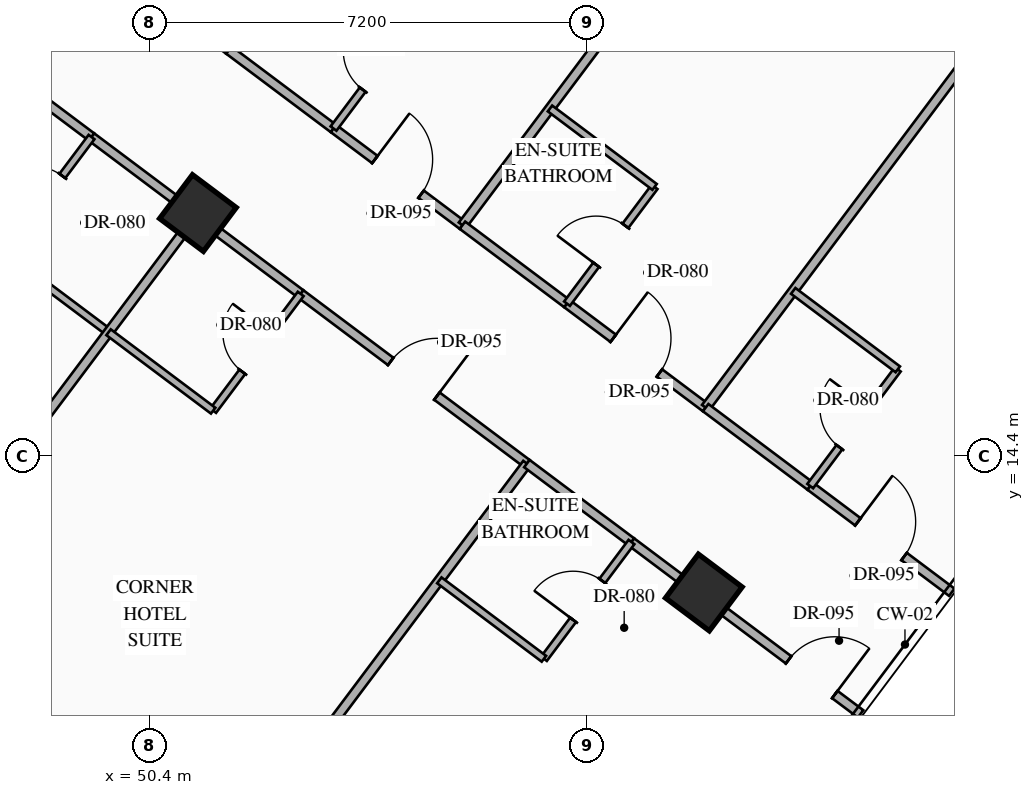
"""IFC4 building model, lengths in metres.
Left out: names, types, materials, properties, quantities, classifications, styles, units other than length and angle.
Written with IfcOpenShell. Run it as: python <this file> out.ifc"""

import sys

from ifc_helpers import new_model, si_unit, direction, frame, frame_2d, origin, origin_2d, place, context, subcontext, project, spatial, rectangle, hollow_rectangle, extrude, element, fill, save


model = new_model("IFC4")
c1 = context("Model", 3, precision=1e-05, world=origin(), true_north=direction((0.0, 1.0)))
c2 = subcontext(c1, "Body", "Model", "MODEL_VIEW")
j1 = project(units=[si_unit("LENGTHUNIT", "METRE"), si_unit("PLANEANGLEUNIT", "RADIAN")], contexts=[c1])
p1 = place(None, origin())
s1 = spatial("IfcSite", under=j1, at=p1, CompositionType="ELEMENT")
p2 = place(p1, origin())
s2 = spatial("IfcBuilding", under=s1, at=p2, CompositionType="ELEMENT")
p3 = place(p2, frame((0.0, 0.0, 74.6)))
s3 = spatial("IfcBuildingStorey", under=s2, at=p3, CompositionType="ELEMENT", Elevation=74.6)
for number, where, z_axis, x_axis in (
    (1, (51.2, 18.4, 0.0), (0.0, 0.0, 1.0), (0.8, -0.6, 0.0)),
    (2, (59.52, 12.16, 0.0), (0.0, 0.0, 1.0), (0.8, -0.6, 0.0)),
):
    element("IfcColumn", number, at=place(p3, frame(where, z_axis=z_axis, x_axis=x_axis)), inside=s3, PredefinedType="COLUMN", context=c2, shape_type="SweptSolid", body=[
        extrude(hollow_rectangle(XDim=0.9, YDim=0.9, WallThickness=0.036, at=origin_2d()), origin(), (0.0, 0.0, 1.0), 3.35),
    ])
p4 = place(p3, frame((53.318, 2.487, 0.0), z_axis=(0.0, 0.0, 1.0), x_axis=(-0.800004174678, 0.599994433723, 0.0)))
e3 = element("IfcWall", 3, at=p4, inside=s3, PredefinedType="STANDARD", context=c2, shape_type="SweptSolid", body=[
    extrude(rectangle(XDim=35.089, YDim=0.28, at=frame_2d((17.544, 0.0))), origin(), (0.0, 0.0, 1.0), 3.13),
])
p5 = place(p4, frame((1.931, 0.0, 0.85)))
e4 = element("IfcOpeningElement", 4, at=p5, cuts=e3, PredefinedType="OPENING", context=c2, shape_type="SweptSolid", body=[
    extrude(rectangle(XDim=1.4, YDim=1.8, at=frame_2d((0.7, 0.9))), frame((0.0, 0.15, 0.0), z_axis=(0.0, -1.0, 0.0), x_axis=(1.0, 0.0, 0.0)), (0.0, 0.0, 1.0), 0.3),
])
p6 = place(p4, frame((6.819, 0.0, 0.85)))
e5 = element("IfcOpeningElement", 5, at=p6, cuts=e3, PredefinedType="OPENING", context=c2, shape_type="SweptSolid", body=[
    extrude(rectangle(XDim=1.4, YDim=1.8, at=frame_2d((0.7, 0.9))), frame((0.0, 0.15, 0.0), z_axis=(0.0, -1.0, 0.0), x_axis=(1.0, 0.0, 0.0)), (0.0, 0.0, 1.0), 0.3),
])
p7 = place(p4, frame((11.832, 0.0, 0.85)))
e6 = element("IfcOpeningElement", 6, at=p7, cuts=e3, PredefinedType="OPENING", context=c2, shape_type="SweptSolid", body=[
    extrude(rectangle(XDim=1.4, YDim=1.8, at=frame_2d((0.7, 0.9))), frame((0.0, 0.15, 0.0), z_axis=(0.0, -1.0, 0.0), x_axis=(1.0, 0.0, 0.0)), (0.0, 0.0, 1.0), 0.3),
])
p8 = place(p4, frame((17.647, 0.0, 0.85)))
e7 = element("IfcOpeningElement", 7, at=p8, cuts=e3, PredefinedType="OPENING", context=c2, shape_type="SweptSolid", body=[
    extrude(rectangle(XDim=1.4, YDim=1.8, at=frame_2d((0.7, 0.9))), frame((0.0, 0.15, 0.0), z_axis=(0.0, -1.0, 0.0), x_axis=(1.0, 0.0, 0.0)), (0.0, 0.0, 1.0), 0.3),
])
p9 = place(p4, frame((21.857, 0.0, 0.85)))
e8 = element("IfcOpeningElement", 8, at=p9, cuts=e3, PredefinedType="OPENING", context=c2, shape_type="SweptSolid", body=[
    extrude(rectangle(XDim=1.4, YDim=1.8, at=frame_2d((0.7, 0.9))), frame((0.0, 0.15, 0.0), z_axis=(0.0, -1.0, 0.0), x_axis=(1.0, 0.0, 0.0)), (0.0, 0.0, 1.0), 0.3),
])
p10 = place(p4, frame((26.87, 0.0, 0.85)))
e9 = element("IfcOpeningElement", 9, at=p10, cuts=e3, PredefinedType="OPENING", context=c2, shape_type="SweptSolid", body=[
    extrude(rectangle(XDim=1.4, YDim=1.8, at=frame_2d((0.7, 0.9))), frame((0.0, 0.15, 0.0), z_axis=(0.0, -1.0, 0.0), x_axis=(1.0, 0.0, 0.0)), (0.0, 0.0, 1.0), 0.3),
])
p11 = place(p4, frame((31.757, 0.0, 0.85)))
e10 = element("IfcOpeningElement", 10, at=p11, cuts=e3, PredefinedType="OPENING", context=c2, shape_type="SweptSolid", body=[
    extrude(rectangle(XDim=1.4, YDim=1.8, at=frame_2d((0.7, 0.9))), frame((0.0, 0.15, 0.0), z_axis=(0.0, -1.0, 0.0), x_axis=(1.0, 0.0, 0.0)), (0.0, 0.0, 1.0), 0.3),
])
p12 = place(p3, frame((49.59, 22.67, 0.0), z_axis=(0.0, 0.0, 1.0), x_axis=(0.800011056104, -0.599985258246, 0.0)))
e11 = element("IfcWall", 11, at=p12, inside=s3, PredefinedType="PARTITIONING", context=c2, shape_type="SweptSolid", body=[
    extrude(rectangle(XDim=2.65, YDim=0.15, at=frame_2d((1.325, 0.0))), origin(), (0.0, 0.0, 1.0), 2.775),
])
p13 = place(p12, frame((0.85, 0.0, 0.0)))
e12 = element("IfcOpeningElement", 12, at=p13, cuts=e11, PredefinedType="OPENING", context=c2, shape_type="SweptSolid", body=[
    extrude(rectangle(XDim=0.95, YDim=2.15, at=frame_2d((0.475, 1.075))), frame((0.0, 0.085, 0.0), z_axis=(0.0, -1.0, 0.0), x_axis=(1.0, 0.0, 0.0)), (0.0, 0.0, 1.0), 0.17),
])
p14 = place(p3, frame((51.71, 21.08, 0.0), z_axis=(0.0, 0.0, 1.0), x_axis=(0.599996617946, 0.80000253653, 0.0)))
e13 = element("IfcWall", 13, at=p14, inside=s3, PredefinedType="PARTITIONING", context=c2, shape_type="SweptSolid", body=[
    extrude(rectangle(XDim=11.55, YDim=0.15, at=frame_2d((5.775, 0.0))), origin(), (0.0, 0.0, 1.0), 3.13),
])
p15 = place(p3, frame((51.71, 21.08, 0.0), z_axis=(0.0, 0.0, 1.0), x_axis=(0.79998637334, -0.60001816845, 0.0)))
e14 = element("IfcWall", 14, at=p15, inside=s3, PredefinedType="PARTITIONING", context=c2, shape_type="SweptSolid", body=[
    extrude(rectangle(XDim=2.15, YDim=0.15, at=frame_2d((1.075, 0.0))), origin(), (0.0, 0.0, 1.0), 2.775),
])
p16 = place(p3, frame((53.43, 19.79, 0.0), z_axis=(0.0, 0.0, 1.0), x_axis=(0.8, -0.6, 0.0)))
e15 = element("IfcWall", 15, at=p16, inside=s3, PredefinedType="PARTITIONING", context=c2, shape_type="SweptSolid", body=[
    extrude(rectangle(XDim=2.65, YDim=0.15, at=frame_2d((1.325, 0.0))), origin(), (0.0, 0.0, 1.0), 2.775),
])
p17 = place(p16, frame((0.85, 0.0, 0.0)))
e16 = element("IfcOpeningElement", 16, at=p17, cuts=e15, PredefinedType="OPENING", context=c2, shape_type="SweptSolid", body=[
    extrude(rectangle(XDim=0.95, YDim=2.15, at=frame_2d((0.475, 1.075))), frame((0.0, 0.085, 0.0), z_axis=(0.0, -1.0, 0.0), x_axis=(1.0, 0.0, 0.0)), (0.0, 0.0, 1.0), 0.17),
])
p18 = place(p3, frame((53.43, 19.79, 0.0), z_axis=(0.0, 0.0, 1.0), x_axis=(0.600065100855, 0.79995117022, 0.0)))
e17 = element("IfcWall", 17, at=p18, inside=s3, PredefinedType="PARTITIONING", context=c2, shape_type="SweptSolid", body=[
    extrude(rectangle(XDim=2.4, YDim=0.12, at=frame_2d((1.2, 0.0))), origin(), (0.0, 0.0, 1.0), 3.13),
])
p19 = place(p18, frame((0.8, 0.0, 0.0)))
e18 = element("IfcOpeningElement", 18, at=p19, cuts=e17, PredefinedType="OPENING", context=c2, shape_type="SweptSolid", body=[
    extrude(rectangle(XDim=0.8, YDim=2.06, at=frame_2d((0.4, 1.03))), frame((0.0, 0.07, 0.0), z_axis=(0.0, -1.0, 0.0), x_axis=(1.0, 0.0, 0.0)), (0.0, 0.0, 1.0), 0.14),
])
p20 = place(p3, frame((55.55, 18.2, 0.0), z_axis=(0.0, 0.0, 1.0), x_axis=(0.599996617946, 0.80000253653, 0.0)))
e19 = element("IfcWall", 19, at=p20, inside=s3, PredefinedType="PARTITIONING", context=c2, shape_type="SweptSolid", body=[
    extrude(rectangle(XDim=11.55, YDim=0.15, at=frame_2d((5.775, 0.0))), origin(), (0.0, 0.0, 1.0), 3.13),
])
p21 = place(p3, frame((55.55, 18.2, 0.0), z_axis=(0.0, 0.0, 1.0), x_axis=(0.79998637334, -0.60001816845, 0.0)))
e20 = element("IfcWall", 20, at=p21, inside=s3, PredefinedType="PARTITIONING", context=c2, shape_type="SweptSolid", body=[
    extrude(rectangle(XDim=2.15, YDim=0.15, at=frame_2d((1.075, 0.0))), origin(), (0.0, 0.0, 1.0), 2.775),
])
p22 = place(p3, frame((57.27, 16.91, 0.0), z_axis=(0.0, 0.0, 1.0), x_axis=(0.800010279488, -0.599986293772, 0.0)))
e21 = element("IfcWall", 21, at=p22, inside=s3, PredefinedType="PARTITIONING", context=c2, shape_type="SweptSolid", body=[
    extrude(rectangle(XDim=2.85, YDim=0.15, at=frame_2d((1.425, 0.0))), origin(), (0.0, 0.0, 1.0), 2.775),
])
p23 = place(p22, frame((0.95, 0.0, 0.0)))
e22 = element("IfcOpeningElement", 22, at=p23, cuts=e21, PredefinedType="OPENING", context=c2, shape_type="SweptSolid", body=[
    extrude(rectangle(XDim=0.95, YDim=2.15, at=frame_2d((0.475, 1.075))), frame((0.0, 0.085, 0.0), z_axis=(0.0, -1.0, 0.0), x_axis=(1.0, 0.0, 0.0)), (0.0, 0.0, 1.0), 0.17),
])
p24 = place(p3, frame((57.27, 16.91, 0.0), z_axis=(0.0, 0.0, 1.0), x_axis=(0.599951172744, 0.800036618114, 0.0)))
e23 = element("IfcWall", 23, at=p24, inside=s3, PredefinedType="PARTITIONING", context=c2, shape_type="SweptSolid", body=[
    extrude(rectangle(XDim=2.4, YDim=0.12, at=frame_2d((1.2, 0.0))), origin(), (0.0, 0.0, 1.0), 3.13),
])
p25 = place(p24, frame((0.8, 0.0, 0.0)))
e24 = element("IfcOpeningElement", 24, at=p25, cuts=e23, PredefinedType="OPENING", context=c2, shape_type="SweptSolid", body=[
    extrude(rectangle(XDim=0.8, YDim=2.06, at=frame_2d((0.4, 1.03))), frame((0.0, 0.07, 0.0), z_axis=(0.0, -1.0, 0.0), x_axis=(1.0, 0.0, 0.0)), (0.0, 0.0, 1.0), 0.14),
])
p26 = place(p3, frame((56.99, 20.12, 0.0), z_axis=(0.0, 0.0, 1.0), x_axis=(0.79998637334, -0.60001816845, 0.0)))
e25 = element("IfcWall", 25, at=p26, inside=s3, PredefinedType="PARTITIONING", context=c2, shape_type="SweptSolid", body=[
    extrude(rectangle(XDim=2.15, YDim=0.12, at=frame_2d((1.075, 0.0))), origin(), (0.0, 0.0, 1.0), 3.13),
])
p27 = place(p3, frame((59.55, 15.2, 0.0), z_axis=(0.0, 0.0, 1.0), x_axis=(0.599996617946, 0.80000253653, 0.0)))
e26 = element("IfcWall", 26, at=p27, inside=s3, PredefinedType="PARTITIONING", context=c2, shape_type="SweptSolid", body=[
    extrude(rectangle(XDim=11.55, YDim=0.15, at=frame_2d((5.775, 0.0))), origin(), (0.0, 0.0, 1.0), 3.13),
])
p28 = place(p3, frame((59.55, 15.2, 0.0), z_axis=(0.0, 0.0, 1.0), x_axis=(0.79998637334, -0.60001816845, 0.0)))
e27 = element("IfcWall", 27, at=p28, inside=s3, PredefinedType="PARTITIONING", context=c2, shape_type="SweptSolid", body=[
    extrude(rectangle(XDim=2.15, YDim=0.15, at=frame_2d((1.075, 0.0))), origin(), (0.0, 0.0, 1.0), 2.775),
])
p29 = place(p3, frame((61.27, 13.91, 0.0), z_axis=(0.0, 0.0, 1.0), x_axis=(0.800010068184, -0.59998657552, 0.0)))
e28 = element("IfcWall", 28, at=p29, inside=s3, PredefinedType="PARTITIONING", context=c2, shape_type="SweptSolid", body=[
    extrude(rectangle(XDim=2.91, YDim=0.15, at=frame_2d((1.455, 0.0))), origin(), (0.0, 0.0, 1.0), 3.13),
])
p30 = place(p29, frame((0.98, 0.0, 0.0)))
e29 = element("IfcOpeningElement", 29, at=p30, cuts=e28, PredefinedType="OPENING", context=c2, shape_type="SweptSolid", body=[
    extrude(rectangle(XDim=0.95, YDim=2.15, at=frame_2d((0.475, 1.075))), frame((0.0, 0.085, 0.0), z_axis=(0.0, -1.0, 0.0), x_axis=(1.0, 0.0, 0.0)), (0.0, 0.0, 1.0), 0.17),
])
p31 = place(p3, frame((61.27, 13.91, 0.0), z_axis=(0.0, 0.0, 1.0), x_axis=(0.599951172744, 0.800036618114, 0.0)))
e30 = element("IfcWall", 30, at=p31, inside=s3, PredefinedType="PARTITIONING", context=c2, shape_type="SweptSolid", body=[
    extrude(rectangle(XDim=2.4, YDim=0.12, at=frame_2d((1.2, 0.0))), origin(), (0.0, 0.0, 1.0), 3.13),
])
p32 = place(p31, frame((0.8, 0.0, 0.0)))
e31 = element("IfcOpeningElement", 31, at=p32, cuts=e30, PredefinedType="OPENING", context=c2, shape_type="SweptSolid", body=[
    extrude(rectangle(XDim=0.8, YDim=2.06, at=frame_2d((0.4, 1.03))), frame((0.0, 0.07, 0.0), z_axis=(0.0, -1.0, 0.0), x_axis=(1.0, 0.0, 0.0)), (0.0, 0.0, 1.0), 0.14),
])
p33 = place(p3, frame((60.99, 17.12, 0.0), z_axis=(0.0, 0.0, 1.0), x_axis=(0.79998637334, -0.60001816845, 0.0)))
e32 = element("IfcWall", 32, at=p33, inside=s3, PredefinedType="PARTITIONING", context=c2, shape_type="SweptSolid", body=[
    extrude(rectangle(XDim=2.15, YDim=0.12, at=frame_2d((1.075, 0.0))), origin(), (0.0, 0.0, 1.0), 3.13),
])
p34 = place(p3, frame((46.37, 21.96, 0.0), z_axis=(0.0, 0.0, 1.0), x_axis=(0.799977170108, -0.600030438649, 0.0)))
e33 = element("IfcWall", 33, at=p34, inside=s3, PredefinedType="PARTITIONING", context=c2, shape_type="SweptSolid", body=[
    extrude(rectangle(XDim=3.85, YDim=0.15, at=frame_2d((1.925, 0.0))), origin(), (0.0, 0.0, 1.0), 2.425),
])
p35 = place(p34, frame((1.45, 0.0, 0.0)))
e34 = element("IfcOpeningElement", 34, at=p35, cuts=e33, PredefinedType="OPENING", context=c2, shape_type="SweptSolid", body=[
    extrude(rectangle(XDim=0.95, YDim=2.15, at=frame_2d((0.475, 1.075))), frame((0.0, 0.085, 0.0), z_axis=(0.0, -1.0, 0.0), x_axis=(1.0, 0.0, 0.0)), (0.0, 0.0, 1.0), 0.17),
])
p36 = place(p3, frame((49.45, 19.65, 0.0), z_axis=(0.0, 0.0, 1.0), x_axis=(0.800040880289, -0.59994548908, 0.0)))
e35 = element("IfcWall", 35, at=p36, inside=s3, PredefinedType="PARTITIONING", context=c2, shape_type="SweptSolid", body=[
    extrude(rectangle(XDim=2.15, YDim=0.15, at=frame_2d((1.075, 0.0))), origin(), (0.0, 0.0, 1.0), 2.425),
])
p37 = place(p3, frame((48.01, 17.73, 0.0), z_axis=(0.0, 0.0, 1.0), x_axis=(0.6, 0.8, 0.0)))
e36 = element("IfcWall", 36, at=p37, inside=s3, PredefinedType="PARTITIONING", context=c2, shape_type="SweptSolid", body=[
    extrude(rectangle(XDim=2.4, YDim=0.12, at=frame_2d((1.2, 0.0))), origin(), (0.0, 0.0, 1.0), 3.13),
])
p38 = place(p37, frame((0.8, 0.0, 0.0)))
e37 = element("IfcOpeningElement", 37, at=p38, cuts=e36, PredefinedType="OPENING", context=c2, shape_type="SweptSolid", body=[
    extrude(rectangle(XDim=0.8, YDim=2.06, at=frame_2d((0.4, 1.03))), frame((0.0, 0.07, 0.0), z_axis=(0.0, -1.0, 0.0), x_axis=(1.0, 0.0, 0.0)), (0.0, 0.0, 1.0), 0.14),
])
p39 = place(p3, frame((48.01, 17.73, 0.0), z_axis=(0.0, 0.0, 1.0), x_axis=(0.79998637334, -0.60001816845, 0.0)))
e38 = element("IfcWall", 38, at=p39, inside=s3, PredefinedType="PARTITIONING", context=c2, shape_type="SweptSolid", body=[
    extrude(rectangle(XDim=2.15, YDim=0.12, at=frame_2d((1.075, 0.0))), origin(), (0.0, 0.0, 1.0), 3.13),
])
p40 = place(p3, frame((44.36, 9.28, 0.0), z_axis=(0.0, 0.0, 1.0), x_axis=(0.599986233332, 0.800010324816, 0.0)))
e39 = element("IfcWall", 39, at=p40, inside=s3, PredefinedType="PARTITIONING", context=c2, shape_type="SweptSolid", body=[
    extrude(rectangle(XDim=11.35, YDim=0.15, at=frame_2d((5.675, 0.0))), origin(), (0.0, 0.0, 1.0), 2.425),
])
p41 = place(p3, frame((51.17, 18.36, 0.0), z_axis=(0.0, 0.0, 1.0), x_axis=(0.79998637334, -0.60001816845, 0.0)))
e40 = element("IfcWall", 40, at=p41, inside=s3, PredefinedType="PARTITIONING", context=c2, shape_type="SweptSolid", body=[
    extrude(rectangle(XDim=2.15, YDim=0.15, at=frame_2d((1.075, 0.0))), origin(), (0.0, 0.0, 1.0), 2.425),
])
p42 = place(p3, frame((52.89, 17.07, 0.0), z_axis=(0.0, 0.0, 1.0), x_axis=(0.800012600101, -0.599983199498, 0.0)))
e41 = element("IfcWall", 41, at=p42, inside=s3, PredefinedType="PARTITIONING", context=c2, shape_type="SweptSolid", body=[
    extrude(rectangle(XDim=4.65, YDim=0.15, at=frame_2d((2.325, 0.0))), origin(), (0.0, 0.0, 1.0), 2.425),
])
p43 = place(p42, frame((1.85, 0.0, 0.0)))
e42 = element("IfcOpeningElement", 42, at=p43, cuts=e41, PredefinedType="OPENING", context=c2, shape_type="SweptSolid", body=[
    extrude(rectangle(XDim=0.95, YDim=2.15, at=frame_2d((0.475, 1.075))), frame((0.0, 0.085, 0.0), z_axis=(0.0, -1.0, 0.0), x_axis=(1.0, 0.0, 0.0)), (0.0, 0.0, 1.0), 0.17),
])
p44 = place(p3, frame((51.45, 15.15, 0.0), z_axis=(0.0, 0.0, 1.0), x_axis=(0.599951172744, 0.800036618114, 0.0)))
e43 = element("IfcWall", 43, at=p44, inside=s3, PredefinedType="PARTITIONING", context=c2, shape_type="SweptSolid", body=[
    extrude(rectangle(XDim=2.4, YDim=0.12, at=frame_2d((1.2, 0.0))), origin(), (0.0, 0.0, 1.0), 3.13),
])
p45 = place(p44, frame((0.8, 0.0, 0.0)))
e44 = element("IfcOpeningElement", 44, at=p45, cuts=e43, PredefinedType="OPENING", context=c2, shape_type="SweptSolid", body=[
    extrude(rectangle(XDim=0.8, YDim=2.06, at=frame_2d((0.4, 1.03))), frame((0.0, 0.07, 0.0), z_axis=(0.0, -1.0, 0.0), x_axis=(1.0, 0.0, 0.0)), (0.0, 0.0, 1.0), 0.14),
])
p46 = place(p3, frame((49.73, 16.44, 0.0), z_axis=(0.0, 0.0, 1.0), x_axis=(0.79998637334, -0.60001816845, 0.0)))
e45 = element("IfcWall", 45, at=p46, inside=s3, PredefinedType="PARTITIONING", context=c2, shape_type="SweptSolid", body=[
    extrude(rectangle(XDim=2.15, YDim=0.12, at=frame_2d((1.075, 0.0))), origin(), (0.0, 0.0, 1.0), 3.13),
])
p47 = place(p3, frame((49.8, 5.2, 0.0), z_axis=(0.0, 0.0, 1.0), x_axis=(0.6, 0.8, 0.0)))
e46 = element("IfcWall", 46, at=p47, inside=s3, PredefinedType="PARTITIONING", context=c2, shape_type="SweptSolid", body=[
    extrude(rectangle(XDim=11.35, YDim=0.15, at=frame_2d((5.675, 0.0))), origin(), (0.0, 0.0, 1.0), 3.13),
])
p48 = place(p3, frame((56.61, 14.28, 0.0), z_axis=(0.0, 0.0, 1.0), x_axis=(0.79998637334, -0.60001816845, 0.0)))
e47 = element("IfcWall", 47, at=p48, inside=s3, PredefinedType="PARTITIONING", context=c2, shape_type="SweptSolid", body=[
    extrude(rectangle(XDim=2.15, YDim=0.15, at=frame_2d((1.075, 0.0))), origin(), (0.0, 0.0, 1.0), 2.425),
])
p49 = place(p3, frame((58.33, 12.99, 0.0), z_axis=(0.0, 0.0, 1.0), x_axis=(0.799993779569, -0.600008293819, 0.0)))
e48 = element("IfcWall", 48, at=p49, inside=s3, PredefinedType="PARTITIONING", context=c2, shape_type="SweptSolid", body=[
    extrude(rectangle(XDim=4.71, YDim=0.15, at=frame_2d((2.355, 0.0))), origin(), (0.0, 0.0, 1.0), 2.425),
])
p50 = place(p49, frame((3.23, 0.0, 0.0)))
e49 = element("IfcOpeningElement", 49, at=p50, cuts=e48, PredefinedType="OPENING", context=c2, shape_type="SweptSolid", body=[
    extrude(rectangle(XDim=0.95, YDim=2.15, at=frame_2d((0.475, 1.075))), frame((0.0, 0.085, 0.0), z_axis=(0.0, -1.0, 0.0), x_axis=(1.0, 0.0, 0.0)), (0.0, 0.0, 1.0), 0.17),
])
p51 = place(p3, frame((56.89, 11.07, 0.0), z_axis=(0.0, 0.0, 1.0), x_axis=(0.600065100855, 0.79995117022, 0.0)))
e50 = element("IfcWall", 50, at=p51, inside=s3, PredefinedType="PARTITIONING", context=c2, shape_type="SweptSolid", body=[
    extrude(rectangle(XDim=2.4, YDim=0.12, at=frame_2d((1.2, 0.0))), origin(), (0.0, 0.0, 1.0), 3.13),
])
p52 = place(p51, frame((0.8, 0.0, 0.0)))
e51 = element("IfcOpeningElement", 51, at=p52, cuts=e50, PredefinedType="OPENING", context=c2, shape_type="SweptSolid", body=[
    extrude(rectangle(XDim=0.8, YDim=2.06, at=frame_2d((0.4, 1.03))), frame((0.0, 0.07, 0.0), z_axis=(0.0, -1.0, 0.0), x_axis=(1.0, 0.0, 0.0)), (0.0, 0.0, 1.0), 0.14),
])
p53 = place(p3, frame((55.17, 12.36, 0.0), z_axis=(0.0, 0.0, 1.0), x_axis=(0.79998637334, -0.60001816845, 0.0)))
e52 = element("IfcWall", 52, at=p53, inside=s3, PredefinedType="PARTITIONING", context=c2, shape_type="SweptSolid", body=[
    extrude(rectangle(XDim=2.15, YDim=0.12, at=frame_2d((1.075, 0.0))), origin(), (0.0, 0.0, 1.0), 3.13),
])
p54 = place(p17, origin())
e53 = element("IfcDoor", 53, at=p54, inside=s3, OperationType="SINGLE_SWING_LEFT", PredefinedType="DOOR", context=c2, shape_type="SweptSolid", body=[
    extrude(rectangle(XDim=0.95, YDim=2.15, at=frame_2d((0.475, 1.075))), frame((0.0, 0.025, 0.0), z_axis=(0.0, -1.0, 0.0), x_axis=(1.0, 0.0, 0.0)), (0.0, 0.0, 1.0), 0.05),
])
fill(e16, e53)
p55 = place(p19, origin())
e54 = element("IfcDoor", 54, at=p55, inside=s3, OperationType="SINGLE_SWING_RIGHT", PredefinedType="DOOR", context=c2, shape_type="SweptSolid", body=[
    extrude(rectangle(XDim=0.8, YDim=2.06, at=frame_2d((0.4, 1.03))), frame((0.0, 0.025, 0.0), z_axis=(0.0, -1.0, 0.0), x_axis=(1.0, 0.0, 0.0)), (0.0, 0.0, 1.0), 0.05),
])
fill(e18, e54)
p56 = place(p23, origin())
e55 = element("IfcDoor", 55, at=p56, inside=s3, OperationType="SINGLE_SWING_LEFT", PredefinedType="DOOR", context=c2, shape_type="SweptSolid", body=[
    extrude(rectangle(XDim=0.95, YDim=2.15, at=frame_2d((0.475, 1.075))), frame((0.0, 0.025, 0.0), z_axis=(0.0, -1.0, 0.0), x_axis=(1.0, 0.0, 0.0)), (0.0, 0.0, 1.0), 0.05),
])
fill(e22, e55)
p57 = place(p25, origin())
e56 = element("IfcDoor", 56, at=p57, inside=s3, OperationType="SINGLE_SWING_LEFT", PredefinedType="DOOR", context=c2, shape_type="SweptSolid", body=[
    extrude(rectangle(XDim=0.8, YDim=2.06, at=frame_2d((0.4, 1.03))), frame((0.0, 0.025, 0.0), z_axis=(0.0, -1.0, 0.0), x_axis=(1.0, 0.0, 0.0)), (0.0, 0.0, 1.0), 0.05),
])
fill(e24, e56)
p58 = place(p30, origin())
e57 = element("IfcDoor", 57, at=p58, inside=s3, OperationType="SINGLE_SWING_LEFT", PredefinedType="DOOR", context=c2, shape_type="SweptSolid", body=[
    extrude(rectangle(XDim=0.95, YDim=2.15, at=frame_2d((0.475, 1.075))), frame((0.0, 0.025, 0.0), z_axis=(0.0, -1.0, 0.0), x_axis=(1.0, 0.0, 0.0)), (0.0, 0.0, 1.0), 0.05),
])
fill(e29, e57)
p59 = place(p32, origin())
e58 = element("IfcDoor", 58, at=p59, inside=s3, OperationType="SINGLE_SWING_RIGHT", PredefinedType="DOOR", context=c2, shape_type="SweptSolid", body=[
    extrude(rectangle(XDim=0.8, YDim=2.06, at=frame_2d((0.4, 1.03))), frame((0.0, 0.025, 0.0), z_axis=(0.0, -1.0, 0.0), x_axis=(1.0, 0.0, 0.0)), (0.0, 0.0, 1.0), 0.05),
])
fill(e31, e58)
p60 = place(p38, origin())
e59 = element("IfcDoor", 59, at=p60, inside=s3, OperationType="SINGLE_SWING_LEFT", PredefinedType="DOOR", context=c2, shape_type="SweptSolid", body=[
    extrude(rectangle(XDim=0.8, YDim=2.06, at=frame_2d((0.4, 1.03))), frame((0.0, 0.025, 0.0), z_axis=(0.0, -1.0, 0.0), x_axis=(1.0, 0.0, 0.0)), (0.0, 0.0, 1.0), 0.05),
])
fill(e37, e59)
p61 = place(p43, origin())
e60 = element("IfcDoor", 60, at=p61, inside=s3, OperationType="SINGLE_SWING_RIGHT", PredefinedType="DOOR", context=c2, shape_type="SweptSolid", body=[
    extrude(rectangle(XDim=0.95, YDim=2.15, at=frame_2d((0.475, 1.075))), frame((0.0, 0.025, 0.0), z_axis=(0.0, -1.0, 0.0), x_axis=(1.0, 0.0, 0.0)), (0.0, 0.0, 1.0), 0.05),
])
fill(e42, e60)
p62 = place(p45, origin())
e61 = element("IfcDoor", 61, at=p62, inside=s3, OperationType="SINGLE_SWING_RIGHT", PredefinedType="DOOR", context=c2, shape_type="SweptSolid", body=[
    extrude(rectangle(XDim=0.8, YDim=2.06, at=frame_2d((0.4, 1.03))), frame((0.0, 0.025, 0.0), z_axis=(0.0, -1.0, 0.0), x_axis=(1.0, 0.0, 0.0)), (0.0, 0.0, 1.0), 0.05),
])
fill(e44, e61)
p63 = place(p50, origin())
e62 = element("IfcDoor", 62, at=p63, inside=s3, OperationType="SINGLE_SWING_RIGHT", PredefinedType="DOOR", context=c2, shape_type="SweptSolid", body=[
    extrude(rectangle(XDim=0.95, YDim=2.15, at=frame_2d((0.475, 1.075))), frame((0.0, 0.025, 0.0), z_axis=(0.0, -1.0, 0.0), x_axis=(1.0, 0.0, 0.0)), (0.0, 0.0, 1.0), 0.05),
])
fill(e49, e62)
p64 = place(p52, origin())
e63 = element("IfcDoor", 63, at=p64, inside=s3, OperationType="SINGLE_SWING_LEFT", PredefinedType="DOOR", context=c2, shape_type="SweptSolid", body=[
    extrude(rectangle(XDim=0.8, YDim=2.06, at=frame_2d((0.4, 1.03))), frame((0.0, 0.025, 0.0), z_axis=(0.0, -1.0, 0.0), x_axis=(1.0, 0.0, 0.0)), (0.0, 0.0, 1.0), 0.05),
])
fill(e51, e63)
save(model, sys.argv[1])
